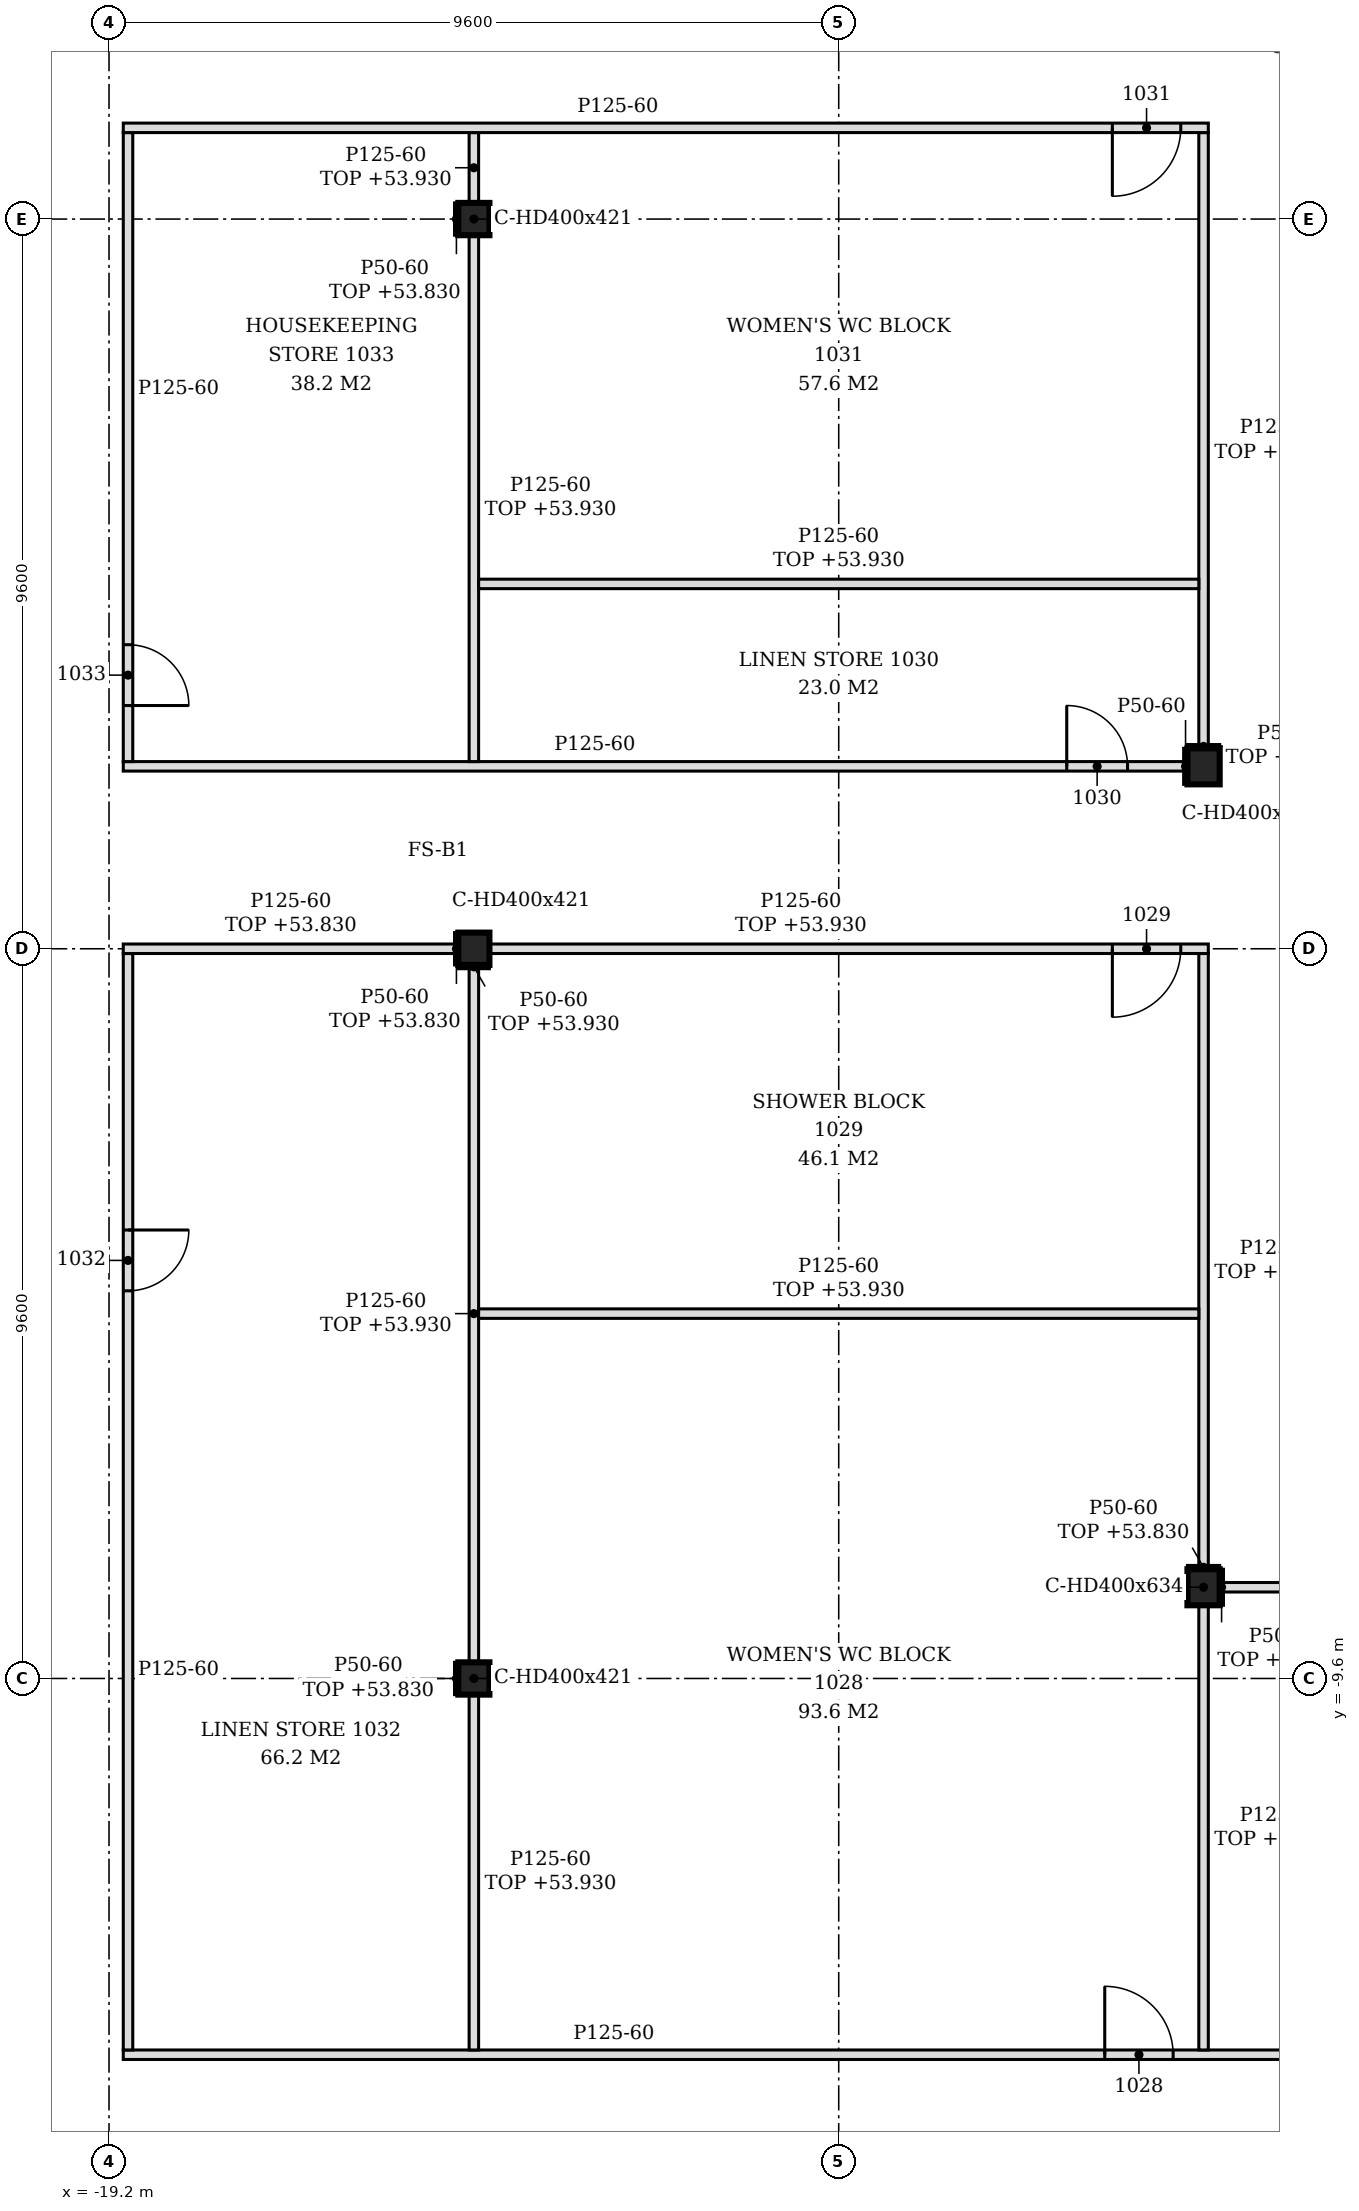
"""IFC4 building model, lengths in metres.
Left out: names, types, materials, properties, quantities, classifications, styles, units other than length and angle.
Written with IfcOpenShell. Run it as: python <this file> out.ifc"""

import sys

from ifc_helpers import new_model, si_unit, direction, frame, frame_2d, origin, origin_2d, place, context, subcontext, project, spatial, polyline, rectangle, i_section, outline, extrude, element, fill, save


model = new_model("IFC4")
c1 = context("Model", 3, precision=1e-05, world=origin(), true_north=direction((0.0, 1.0)))
c2 = subcontext(c1, "Body", "Model", "MODEL_VIEW")
j1 = project(units=[si_unit("LENGTHUNIT", "METRE"), si_unit("PLANEANGLEUNIT", "RADIAN")], contexts=[c1])
p1 = place(None, origin())
s1 = spatial("IfcSite", under=j1, at=p1, CompositionType="ELEMENT")
p2 = place(p1, origin())
s2 = spatial("IfcBuilding", under=s1, at=p2, CompositionType="ELEMENT")
p3 = place(p2, frame((0.0, 0.0, 51.0)))
s3 = spatial("IfcBuildingStorey", under=s2, at=p3, CompositionType="ELEMENT", Elevation=51.0)
for number, where, z_axis, x_axis in (
    (1, (-4.8, -8.4, -0.15), (0.0, 0.0, 1.0), (1.0, 0.0, 0.0)),
    (2, (-4.8, 2.4, -0.15), (0.0, 0.0, 1.0), (1.0, 0.0, 0.0)),
):
    element("IfcColumn", number, at=place(p3, frame(where, z_axis=z_axis, x_axis=x_axis)), inside=s3, PredefinedType="COLUMN", context=c2, shape_type="SweptSolid", body=[
        extrude(i_section(OverallWidth=0.424, OverallDepth=0.474, WebThickness=0.048, FlangeThickness=0.077, FilletRadius=0.015, at=origin_2d()), origin(), (0.0, 0.0, 1.0), 3.6),
    ])
for number, where, z_axis, x_axis in (
    (3, (-14.4, -9.6, -0.15), (0.0, 0.0, 1.0), (1.0, 0.0, 0.0)),
    (4, (-14.4, 0.0, -0.15), (0.0, 0.0, 1.0), (1.0, 0.0, 0.0)),
    (5, (-14.4, 9.6, -0.15), (0.0, 0.0, 1.0), (1.0, 0.0, 0.0)),
):
    element("IfcColumn", number, at=place(p3, frame(where, z_axis=z_axis, x_axis=x_axis)), inside=s3, PredefinedType="COLUMN", context=c2, shape_type="SweptSolid", body=[
        extrude(i_section(OverallWidth=0.409, OverallDepth=0.425, WebThickness=0.033, FlangeThickness=0.052, FilletRadius=0.015, at=origin_2d()), origin(), (0.0, 0.0, 1.0), 3.6),
    ])
p4 = place(p3, frame((-19.012, -14.55, 0.0), z_axis=(0.0, 0.0, 1.0), x_axis=(1.0, 0.0, 0.0)))
e6 = element("IfcWall", 6, at=p4, inside=s3, PredefinedType="PARTITIONING", context=c2, shape_type="SweptSolid", body=[
    extrude(outline(polyline([(0.0, 0.0), (19.075, 0.0), (19.075, 3.45), (14.363, 3.45), (14.361, 2.73), (14.062, 2.73), (14.061, 3.45), (4.762, 3.45), (4.76, 2.93), (4.462, 2.93), (4.46, 2.83), (0.0, 2.83), (0.0, 0.0)])), frame((0.0, 0.062, 0.0), z_axis=(0.0, -1.0, 0.0), x_axis=(1.0, 0.0, 0.0)), (0.0, 0.0, 1.0), 0.125),
])
p5 = place(p4, frame((12.913, 0.0, 0.0)))
e7 = element("IfcOpeningElement", 7, at=p5, cuts=e6, PredefinedType="OPENING", context=c2, shape_type="SweptSolid", body=[
    extrude(rectangle(XDim=0.9, YDim=2.1, at=frame_2d((0.45, 1.05))), frame((0.0, 0.073, 0.0), z_axis=(0.0, -1.0, 0.0), x_axis=(1.0, 0.0, 0.0)), (0.0, 0.0, 1.0), 0.145),
])
p6 = place(p3, frame((-18.95, -14.488, 0.0), z_axis=(0.0, 0.0, 1.0), x_axis=(0.0, 1.0, 0.0)))
e8 = element("IfcWall", 8, at=p6, inside=s3, PredefinedType="PARTITIONING", context=c2, shape_type="SweptSolid", body=[
    extrude(outline(polyline([(0.0, 0.0), (14.425, 0.0), (14.425, 2.83), (14.377, 2.83), (14.375, 3.45), (9.798, 3.45), (9.795, 2.83), (9.577, 2.83), (9.575, 3.45), (4.998, 3.45), (4.996, 2.83), (4.778, 2.83), (4.775, 3.45), (0.198, 3.45), (0.196, 2.83), (0.0, 2.83), (0.0, 0.0)])), frame((0.0, 0.062, 0.0), z_axis=(0.0, -1.0, 0.0), x_axis=(1.0, 0.0, 0.0)), (0.0, 0.0, 1.0), 0.125),
])
p7 = place(p6, frame((9.988, 0.0, 0.0)))
e9 = element("IfcOpeningElement", 9, at=p7, cuts=e8, PredefinedType="OPENING", context=c2, shape_type="SweptSolid", body=[
    extrude(rectangle(XDim=0.8, YDim=2.1, at=frame_2d((0.4, 1.05))), frame((0.0, 0.073, 0.0), z_axis=(0.0, -1.0, 0.0), x_axis=(1.0, 0.0, 0.0)), (0.0, 0.0, 1.0), 0.145),
])
p8 = place(p3, frame((-14.4, -14.488, 0.0), z_axis=(0.0, 0.0, 1.0), x_axis=(0.0, 1.0, 0.0)))
e10 = element("IfcWall", 10, at=p8, inside=s3, PredefinedType="PARTITIONING", context=c2, shape_type="SweptSolid", body=[
    extrude(rectangle(XDim=4.675, YDim=0.125, at=frame_2d((2.337, 0.0))), origin(), (0.0, 0.0, 1.0), 2.93),
])
p9 = place(p3, frame((-4.8, -14.488, 0.0), z_axis=(0.0, 0.0, 1.0), x_axis=(0.0, 1.0, 0.0)))
e11 = element("IfcWall", 11, at=p9, inside=s3, PredefinedType="PARTITIONING", context=c2, shape_type="SweptSolid", body=[
    extrude(rectangle(XDim=5.851, YDim=0.125, at=frame_2d((2.925, 0.0))), origin(), (0.0, 0.0, 1.0), 2.73),
])
p10 = place(p3, frame((-14.4, -9.387, 0.0), z_axis=(0.0, 0.0, 1.0), x_axis=(0.0, 1.0, 0.0)))
e12 = element("IfcWall", 12, at=p10, inside=s3, PredefinedType="PARTITIONING", context=c2, shape_type="SweptSolid", body=[
    extrude(rectangle(XDim=9.175, YDim=0.125, at=frame_2d((4.587, 0.0))), origin(), (0.0, 0.0, 1.0), 2.93),
])
p11 = place(p3, frame((-4.588, -8.4, 0.0), z_axis=(0.0, 0.0, 1.0), x_axis=(1.0, 0.0, 0.0)))
e13 = element("IfcWall", 13, at=p11, inside=s3, PredefinedType="PARTITIONING", context=c2, shape_type="SweptSolid", body=[
    extrude(rectangle(XDim=4.65, YDim=0.125, at=frame_2d((2.325, 0.0))), origin(), (0.0, 0.0, 1.0), 2.83),
])
p12 = place(p3, frame((-4.8, -8.163, 0.0), z_axis=(0.0, 0.0, 1.0), x_axis=(0.0, 1.0, 0.0)))
e14 = element("IfcWall", 14, at=p12, inside=s3, PredefinedType="PARTITIONING", context=c2, shape_type="SweptSolid", body=[
    extrude(rectangle(XDim=8.101, YDim=0.125, at=frame_2d((4.05, 0.0))), origin(), (0.0, 0.0, 1.0), 2.83),
])
p13 = place(p3, frame((-14.337, -4.8, 0.0), z_axis=(0.0, 0.0, 1.0), x_axis=(1.0, 0.0, 0.0)))
e15 = element("IfcWall", 15, at=p13, inside=s3, PredefinedType="PARTITIONING", context=c2, shape_type="SweptSolid", body=[
    extrude(outline(polyline([(0.0, 0.0), (9.475, 0.0), (9.475, 2.83), (9.387, 2.83), (9.385, 2.93), (0.0, 2.93), (0.0, 0.0)])), frame((0.0, 0.062, 0.0), z_axis=(0.0, -1.0, 0.0), x_axis=(1.0, 0.0, 0.0)), (0.0, 0.0, 1.0), 0.125),
])
p14 = place(p3, frame((-19.012, 0.0, 0.0), z_axis=(0.0, 0.0, 1.0), x_axis=(1.0, 0.0, 0.0)))
e16 = element("IfcWall", 16, at=p14, inside=s3, PredefinedType="PARTITIONING", context=c2, shape_type="SweptSolid", body=[
    extrude(rectangle(XDim=4.408, YDim=0.125, at=frame_2d((2.204, 0.0))), origin(), (0.0, 0.0, 1.0), 2.83),
])
p15 = place(p3, frame((-14.196, 0.0, 0.0), z_axis=(0.0, 0.0, 1.0), x_axis=(1.0, 0.0, 0.0)))
e17 = element("IfcWall", 17, at=p15, inside=s3, PredefinedType="PARTITIONING", context=c2, shape_type="SweptSolid", body=[
    extrude(outline(polyline([(0.0, 0.0), (9.458, 0.0), (9.458, 2.83), (9.246, 2.83), (9.243, 2.93), (0.0, 2.93), (0.0, 0.0)])), frame((0.0, 0.062, 0.0), z_axis=(0.0, -1.0, 0.0), x_axis=(1.0, 0.0, 0.0)), (0.0, 0.0, 1.0), 0.125),
])
p16 = place(p15, frame((8.196, 0.0, 0.0)))
e18 = element("IfcOpeningElement", 18, at=p16, cuts=e17, PredefinedType="OPENING", context=c2, shape_type="SweptSolid", body=[
    extrude(rectangle(XDim=0.9, YDim=2.1, at=frame_2d((0.45, 1.05))), frame((0.0, 0.073, 0.0), z_axis=(0.0, -1.0, 0.0), x_axis=(1.0, 0.0, 0.0)), (0.0, 0.0, 1.0), 0.145),
])
p17 = place(p3, frame((-19.012, 2.4, 0.0), z_axis=(0.0, 0.0, 1.0), x_axis=(1.0, 0.0, 0.0)))
e19 = element("IfcWall", 19, at=p17, inside=s3, PredefinedType="PARTITIONING", context=c2, shape_type="SweptSolid", body=[
    extrude(outline(polyline([(0.0, 0.0), (14.0, 0.0), (14.0, 3.45), (4.762, 3.45), (4.76, 2.93), (4.462, 2.93), (4.46, 3.45), (0.0, 3.45), (0.0, 0.0)])), frame((0.0, 0.062, 0.0), z_axis=(0.0, -1.0, 0.0), x_axis=(1.0, 0.0, 0.0)), (0.0, 0.0, 1.0), 0.125),
])
p18 = place(p17, frame((12.413, 0.0, 0.0)))
e20 = element("IfcOpeningElement", 20, at=p18, cuts=e19, PredefinedType="OPENING", context=c2, shape_type="SweptSolid", body=[
    extrude(rectangle(XDim=0.8, YDim=2.1, at=frame_2d((0.4, 1.05))), frame((0.0, 0.073, 0.0), z_axis=(0.0, -1.0, 0.0), x_axis=(1.0, 0.0, 0.0)), (0.0, 0.0, 1.0), 0.145),
])
p19 = place(p3, frame((-18.95, 2.462, 0.0), z_axis=(0.0, 0.0, 1.0), x_axis=(0.0, 1.0, 0.0)))
e21 = element("IfcWall", 21, at=p19, inside=s3, PredefinedType="PARTITIONING", context=c2, shape_type="SweptSolid", body=[
    extrude(outline(polyline([(0.0, 0.0), (8.275, 0.0), (8.275, 3.45), (7.248, 3.45), (7.246, 2.83), (7.028, 2.83), (7.025, 3.45), (2.448, 3.45), (2.446, 2.83), (2.228, 2.83), (2.226, 3.45), (0.0, 3.45), (0.0, 0.0)])), frame((0.0, 0.062, 0.0), z_axis=(0.0, -1.0, 0.0), x_axis=(1.0, 0.0, 0.0)), (0.0, 0.0, 1.0), 0.125),
])
p20 = place(p19, frame((0.738, 0.0, 0.0)))
e22 = element("IfcOpeningElement", 22, at=p20, cuts=e21, PredefinedType="OPENING", context=c2, shape_type="SweptSolid", body=[
    extrude(rectangle(XDim=0.8, YDim=2.1, at=frame_2d((0.4, 1.05))), frame((0.0, 0.073, 0.0), z_axis=(0.0, -1.0, 0.0), x_axis=(1.0, 0.0, 0.0)), (0.0, 0.0, 1.0), 0.145),
])
p21 = place(p3, frame((-14.4, 2.462, 0.0), z_axis=(0.0, 0.0, 1.0), x_axis=(0.0, 1.0, 0.0)))
e23 = element("IfcWall", 23, at=p21, inside=s3, PredefinedType="PARTITIONING", context=c2, shape_type="SweptSolid", body=[
    extrude(rectangle(XDim=6.925, YDim=0.125, at=frame_2d((3.462, 0.0))), origin(), (0.0, 0.0, 1.0), 2.93),
])
p22 = place(p3, frame((-4.8, 2.637, 0.0), z_axis=(0.0, 0.0, 1.0), x_axis=(0.0, 1.0, 0.0)))
e24 = element("IfcWall", 24, at=p22, inside=s3, PredefinedType="PARTITIONING", context=c2, shape_type="SweptSolid", body=[
    extrude(rectangle(XDim=8.101, YDim=0.125, at=frame_2d((4.05, 0.0))), origin(), (0.0, 0.0, 1.0), 2.83),
])
p23 = place(p3, frame((-14.337, 4.8, 0.0), z_axis=(0.0, 0.0, 1.0), x_axis=(1.0, 0.0, 0.0)))
e25 = element("IfcWall", 25, at=p23, inside=s3, PredefinedType="PARTITIONING", context=c2, shape_type="SweptSolid", body=[
    extrude(outline(polyline([(0.0, 0.0), (9.475, 0.0), (9.475, 2.83), (9.387, 2.83), (9.385, 2.93), (0.0, 2.93), (0.0, 0.0)])), frame((0.0, 0.062, 0.0), z_axis=(0.0, -1.0, 0.0), x_axis=(1.0, 0.0, 0.0)), (0.0, 0.0, 1.0), 0.125),
])
p24 = place(p3, frame((-14.4, 9.812, 0.0), z_axis=(0.0, 0.0, 1.0), x_axis=(0.0, 1.0, 0.0)))
e26 = element("IfcWall", 26, at=p24, inside=s3, PredefinedType="PARTITIONING", context=c2, shape_type="SweptSolid", body=[
    extrude(rectangle(XDim=0.925, YDim=0.125, at=frame_2d((0.462, 0.0))), origin(), (0.0, 0.0, 1.0), 2.93),
])
p25 = place(p3, frame((-19.012, 10.8, 0.0), z_axis=(0.0, 0.0, 1.0), x_axis=(1.0, 0.0, 0.0)))
e27 = element("IfcWall", 27, at=p25, inside=s3, PredefinedType="PARTITIONING", context=c2, shape_type="SweptSolid", body=[
    extrude(outline(polyline([(0.0, 0.0), (14.275, 0.0), (14.275, 2.83), (14.062, 2.83), (14.061, 3.45), (4.762, 3.45), (4.76, 2.93), (4.462, 2.93), (4.46, 3.45), (0.0, 3.45), (0.0, 0.0)])), frame((0.0, 0.062, 0.0), z_axis=(0.0, -1.0, 0.0), x_axis=(1.0, 0.0, 0.0)), (0.0, 0.0, 1.0), 0.125),
])
p26 = place(p25, frame((13.012, 0.0, 0.0)))
e28 = element("IfcOpeningElement", 28, at=p26, cuts=e27, PredefinedType="OPENING", context=c2, shape_type="SweptSolid", body=[
    extrude(rectangle(XDim=0.9, YDim=2.1, at=frame_2d((0.45, 1.05))), frame((0.0, 0.073, 0.0), z_axis=(0.0, -1.0, 0.0), x_axis=(1.0, 0.0, 0.0)), (0.0, 0.0, 1.0), 0.145),
])
p27 = place(p3, frame((-14.629, -9.812, 0.0), z_axis=(0.0, 0.0, 1.0), x_axis=(0.0, 1.0, 0.0)))
e29 = element("IfcWall", 29, at=p27, inside=s3, PredefinedType="PARTITIONING", context=c2, shape_type="SweptSolid", body=[
    extrude(rectangle(XDim=0.425, YDim=0.05, at=frame_2d((0.212, 0.0))), origin(), (0.0, 0.0, 1.0), 2.83),
])
p28 = place(p3, frame((-14.629, -0.212, 0.0), z_axis=(0.0, 0.0, 1.0), x_axis=(0.0, 1.0, 0.0)))
e30 = element("IfcWall", 30, at=p28, inside=s3, PredefinedType="PARTITIONING", context=c2, shape_type="SweptSolid", body=[
    extrude(rectangle(XDim=0.425, YDim=0.05, at=frame_2d((0.212, 0.0))), origin(), (0.0, 0.0, 1.0), 2.83),
])
p29 = place(p3, frame((-4.563, -8.637, 0.0), z_axis=(0.0, 0.0, 1.0), x_axis=(0.0, 1.0, 0.0)))
e31 = element("IfcWall", 31, at=p29, inside=s3, PredefinedType="PARTITIONING", context=c2, shape_type="SweptSolid", body=[
    extrude(rectangle(XDim=0.474, YDim=0.05, at=frame_2d((0.237, 0.0))), origin(), (0.0, 0.0, 1.0), 2.83),
])
p30 = place(p3, frame((-5.012, -8.138, 0.0), z_axis=(0.0, 0.0, 1.0), x_axis=(1.0, 0.0, 0.0)))
e32 = element("IfcWall", 32, at=p30, inside=s3, PredefinedType="PARTITIONING", context=c2, shape_type="SweptSolid", body=[
    extrude(rectangle(XDim=0.424, YDim=0.05, at=frame_2d((0.212, 0.0))), origin(), (0.0, 0.0, 1.0), 2.83),
])
p31 = place(p3, frame((-14.604, -0.238, 0.0), z_axis=(0.0, 0.0, 1.0), x_axis=(1.0, 0.0, 0.0)))
e33 = element("IfcWall", 33, at=p31, inside=s3, PredefinedType="PARTITIONING", context=c2, shape_type="SweptSolid", body=[
    extrude(rectangle(XDim=0.409, YDim=0.05, at=frame_2d((0.205, 0.0))), origin(), (0.0, 0.0, 1.0), 2.93),
])
p32 = place(p3, frame((-5.012, 2.662, 0.0), z_axis=(0.0, 0.0, 1.0), x_axis=(1.0, 0.0, 0.0)))
e34 = element("IfcWall", 34, at=p32, inside=s3, PredefinedType="PARTITIONING", context=c2, shape_type="SweptSolid", body=[
    extrude(rectangle(XDim=0.424, YDim=0.05, at=frame_2d((0.212, 0.0))), origin(), (0.0, 0.0, 1.0), 2.83),
])
p33 = place(p3, frame((-14.629, 9.387, 0.0), z_axis=(0.0, 0.0, 1.0), x_axis=(0.0, 1.0, 0.0)))
e35 = element("IfcWall", 35, at=p33, inside=s3, PredefinedType="PARTITIONING", context=c2, shape_type="SweptSolid", body=[
    extrude(rectangle(XDim=0.425, YDim=0.05, at=frame_2d((0.212, 0.0))), origin(), (0.0, 0.0, 1.0), 2.83),
])
p34 = place(p3, frame((-5.037, 2.163, 0.0), z_axis=(0.0, 0.0, 1.0), x_axis=(0.0, 1.0, 0.0)))
e36 = element("IfcWall", 36, at=p34, inside=s3, PredefinedType="PARTITIONING", context=c2, shape_type="SweptSolid", body=[
    extrude(rectangle(XDim=0.474, YDim=0.05, at=frame_2d((0.237, 0.0))), origin(), (0.0, 0.0, 1.0), 3.45),
])
p35 = place(p5, origin())
e37 = element("IfcDoor", 37, at=p35, inside=s3, OperationType="SINGLE_SWING_LEFT", PredefinedType="DOOR", context=c2, shape_type="SweptSolid", body=[
    extrude(rectangle(XDim=0.9, YDim=2.1, at=frame_2d((0.45, 1.05))), frame((0.0, 0.025, 0.0), z_axis=(0.0, -1.0, 0.0), x_axis=(1.0, 0.0, 0.0)), (0.0, 0.0, 1.0), 0.05),
])
fill(e7, e37)
p36 = place(p16, frame((0.9, 0.0, 0.0), z_axis=(0.0, 0.0, 1.0), x_axis=(-1.0, 0.0, 0.0)))
e38 = element("IfcDoor", 38, at=p36, inside=s3, OperationType="SINGLE_SWING_RIGHT", PredefinedType="DOOR", context=c2, shape_type="SweptSolid", body=[
    extrude(rectangle(XDim=0.9, YDim=2.1, at=frame_2d((0.45, 1.05))), frame((0.0, 0.025, 0.0), z_axis=(0.0, -1.0, 0.0), x_axis=(1.0, 0.0, 0.0)), (0.0, 0.0, 1.0), 0.05),
])
fill(e18, e38)
p37 = place(p18, origin())
e39 = element("IfcDoor", 39, at=p37, inside=s3, OperationType="SINGLE_SWING_LEFT", PredefinedType="DOOR", context=c2, shape_type="SweptSolid", body=[
    extrude(rectangle(XDim=0.8, YDim=2.1, at=frame_2d((0.4, 1.05))), frame((0.0, 0.025, 0.0), z_axis=(0.0, -1.0, 0.0), x_axis=(1.0, 0.0, 0.0)), (0.0, 0.0, 1.0), 0.05),
])
fill(e20, e39)
p38 = place(p26, frame((0.9, 0.0, 0.0), z_axis=(0.0, 0.0, 1.0), x_axis=(-1.0, 0.0, 0.0)))
e40 = element("IfcDoor", 40, at=p38, inside=s3, OperationType="SINGLE_SWING_RIGHT", PredefinedType="DOOR", context=c2, shape_type="SweptSolid", body=[
    extrude(rectangle(XDim=0.9, YDim=2.1, at=frame_2d((0.45, 1.05))), frame((0.0, 0.025, 0.0), z_axis=(0.0, -1.0, 0.0), x_axis=(1.0, 0.0, 0.0)), (0.0, 0.0, 1.0), 0.05),
])
fill(e28, e40)
p39 = place(p7, frame((0.8, 0.0, 0.0), z_axis=(0.0, 0.0, 1.0), x_axis=(-1.0, 0.0, 0.0)))
e41 = element("IfcDoor", 41, at=p39, inside=s3, OperationType="SINGLE_SWING_LEFT", PredefinedType="DOOR", context=c2, shape_type="SweptSolid", body=[
    extrude(rectangle(XDim=0.8, YDim=2.1, at=frame_2d((0.4, 1.05))), frame((0.0, 0.025, 0.0), z_axis=(0.0, -1.0, 0.0), x_axis=(1.0, 0.0, 0.0)), (0.0, 0.0, 1.0), 0.05),
])
fill(e9, e41)
p40 = place(p20, frame((0.8, 0.0, 0.0), z_axis=(0.0, 0.0, 1.0), x_axis=(-1.0, 0.0, 0.0)))
e42 = element("IfcDoor", 42, at=p40, inside=s3, OperationType="SINGLE_SWING_RIGHT", PredefinedType="DOOR", context=c2, shape_type="SweptSolid", body=[
    extrude(rectangle(XDim=0.8, YDim=2.1, at=frame_2d((0.4, 1.05))), frame((0.0, 0.025, 0.0), z_axis=(0.0, -1.0, 0.0), x_axis=(1.0, 0.0, 0.0)), (0.0, 0.0, 1.0), 0.05),
])
fill(e22, e42)
save(model, sys.argv[1])
